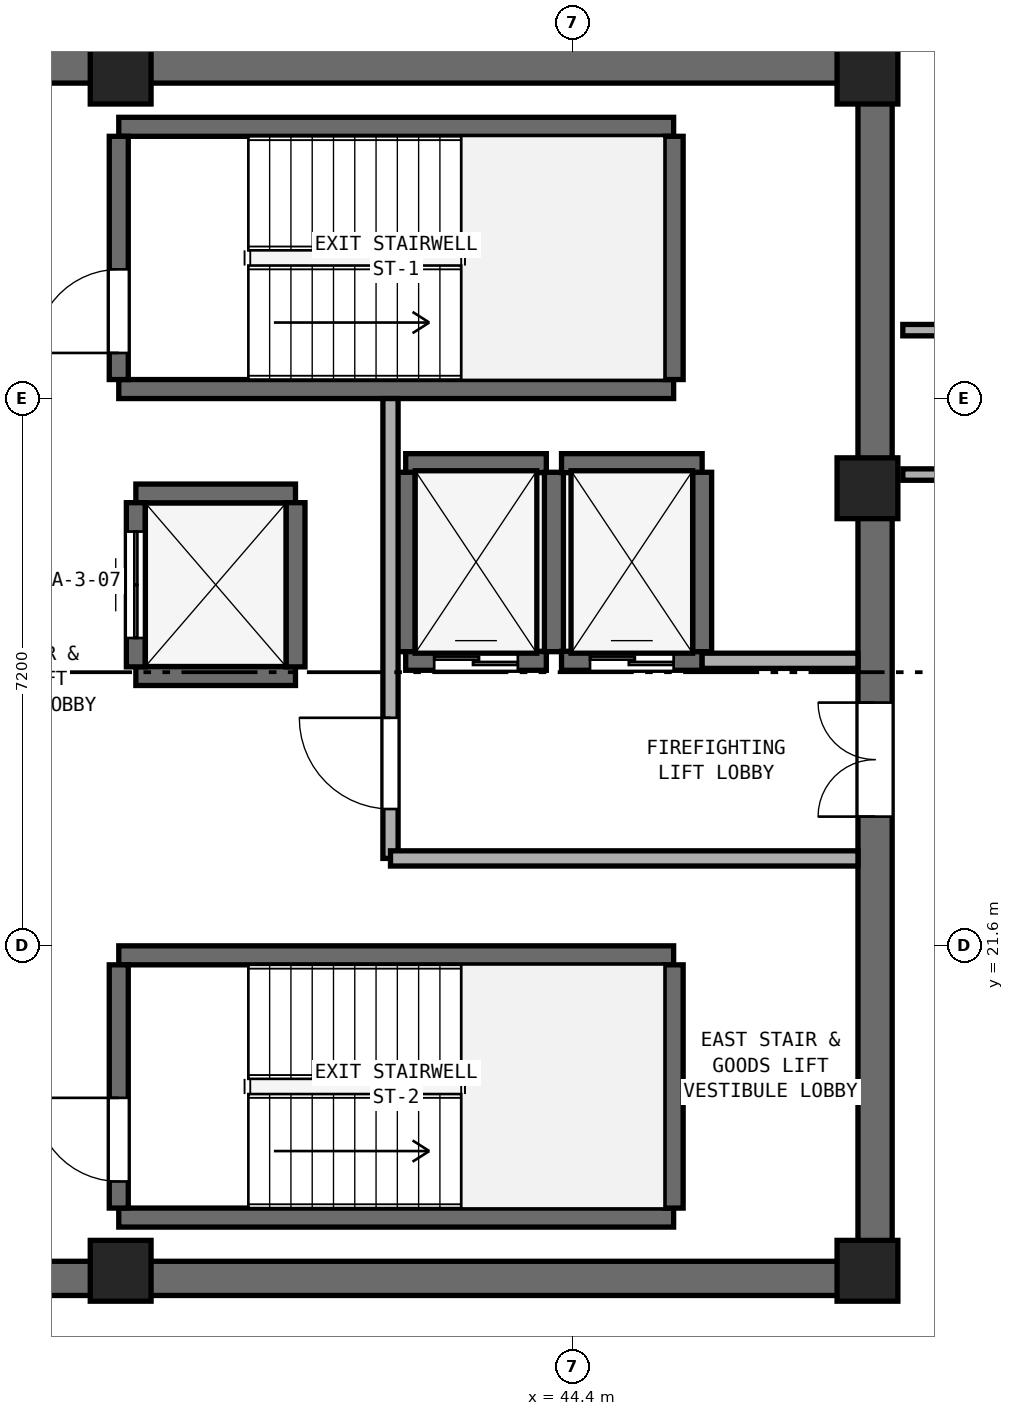
"""IFC4 building model, lengths in metres.
Left out: names, types, materials, properties, quantities, classifications, styles, units other than length and angle.
Written with IfcOpenShell. Run it as: python <this file> out.ifc"""

import sys

from ifc_helpers import new_model, si_unit, direction, frame, frame_2d, origin, origin_2d, place, context, subcontext, project, spatial, rectangle, extrude, element, fill, save


model = new_model("IFC4")
c1 = context("Model", 3, precision=1e-05, world=origin(), true_north=direction((0.0, 1.0)))
c2 = subcontext(c1, "Body", "Model", "MODEL_VIEW")
j1 = project(units=[si_unit("LENGTHUNIT", "METRE"), si_unit("PLANEANGLEUNIT", "RADIAN")], contexts=[c1])
p1 = place(None, origin())
s1 = spatial("IfcSite", under=j1, at=p1, CompositionType="ELEMENT")
p2 = place(p1, origin())
s2 = spatial("IfcBuilding", under=s1, at=p2, CompositionType="ELEMENT")
p3 = place(p2, frame((0.0, 0.0, 301.0)))
s3 = spatial("IfcBuildingStorey", under=s2, at=p3, CompositionType="ELEMENT", Elevation=301.0)
for number, where, z_axis, x_axis in (
    (1, (25.4, 17.225, 0.0), (0.0, 0.0, 1.0), (1.0, 0.0, 0.0)),
    (2, (25.4, 33.175, 0.0), (0.0, 0.0, 1.0), (1.0, 0.0, 0.0)),
):
    element("IfcWall", number, at=place(p3, frame(where, z_axis=z_axis, x_axis=x_axis)), inside=s3, PredefinedType="SHEAR", context=c2, shape_type="SweptSolid", body=[
        extrude(rectangle(XDim=23.2, YDim=0.45, at=frame_2d((11.6, 0.0))), origin(), (0.0, 0.0, 1.0), 3.54),
    ])
p4 = place(p3, frame((48.375, 17.45, 0.0), z_axis=(0.0, 0.0, 1.0), x_axis=(0.0, 1.0, 0.0)))
e3 = element("IfcWall", 3, at=p4, inside=s3, PredefinedType="SHEAR", context=c2, shape_type="SweptSolid", body=[
    extrude(rectangle(XDim=15.5, YDim=0.45, at=frame_2d((7.75, 0.0))), origin(), (0.0, 0.0, 1.0), 3.54),
])
p5 = place(p4, frame((5.85, 0.0, 0.0)))
e4 = element("IfcOpeningElement", 4, at=p5, cuts=e3, PredefinedType="OPENING", context=c2, shape_type="SweptSolid", body=[
    extrude(rectangle(XDim=1.5, YDim=2.15, at=frame_2d((0.75, 1.075))), frame((0.0, 0.235, 0.0), z_axis=(0.0, -1.0, 0.0), x_axis=(1.0, 0.0, 0.0)), (0.0, 0.0, 1.0), 0.47),
])
for number, where, z_axis, x_axis in (
    (5, (38.45, 17.325, 0.0), (0.0, 0.0, 1.0), (1.0, 0.0, 0.0)),
    (6, (48.275, 17.325, 0.0), (0.0, 0.0, 1.0), (1.0, 0.0, 0.0)),
    (7, (48.275, 27.62, 0.0), (0.0, 0.0, 1.0), (1.0, 0.0, 0.0)),
    (8, (48.275, 33.075, 0.0), (0.0, 0.0, 1.0), (1.0, 0.0, 0.0)),
    (9, (38.45, 33.075, 0.0), (0.0, 0.0, 1.0), (1.0, 0.0, 0.0)),
):
    element("IfcColumn", number, at=place(p3, frame(where, z_axis=z_axis, x_axis=x_axis)), inside=s3, PredefinedType="PILASTER", context=c2, shape_type="SweptSolid", body=[
        extrude(rectangle(XDim=0.8, YDim=0.8, at=origin_2d()), origin(), (0.0, 0.0, 1.0), 3.8),
    ])
for number, where, z_axis, x_axis in (
    (10, (38.425, 28.925, 0.0), (0.0, 0.0, 1.0), (1.0, 0.0, 0.0)),
    (11, (38.425, 32.375, 0.0), (0.0, 0.0, 1.0), (1.0, 0.0, 0.0)),
):
    element("IfcWall", number, at=place(p3, frame(where, z_axis=z_axis, x_axis=x_axis)), inside=s3, PredefinedType="SHEAR", context=c2, shape_type="SweptSolid", body=[
        extrude(rectangle(XDim=7.3, YDim=0.25, at=frame_2d((3.65, 0.0))), origin(), (0.0, 0.0, 1.0), 3.54),
    ])
p6 = place(p3, frame((38.425, 29.05, 0.0), z_axis=(0.0, 0.0, 1.0), x_axis=(0.0, 1.0, 0.0)))
e12 = element("IfcWall", 12, at=p6, inside=s3, PredefinedType="SHEAR", context=c2, shape_type="SweptSolid", body=[
    extrude(rectangle(XDim=3.2, YDim=0.25, at=frame_2d((1.6, 0.0))), origin(), (0.0, 0.0, 1.0), 3.54),
])
p7 = place(p6, frame((0.35, 0.0, 0.0)))
e13 = element("IfcOpeningElement", 13, at=p7, cuts=e12, PredefinedType="OPENING", context=c2, shape_type="SweptSolid", body=[
    extrude(rectangle(XDim=1.1, YDim=2.15, at=frame_2d((0.55, 1.075))), frame((0.0, 0.135, 0.0), z_axis=(0.0, -1.0, 0.0), x_axis=(1.0, 0.0, 0.0)), (0.0, 0.0, 1.0), 0.27),
])
p8 = place(p3, frame((45.725, 29.05, 0.0), z_axis=(0.0, 0.0, 1.0), x_axis=(0.0, 1.0, 0.0)))
e14 = element("IfcWall", 14, at=p8, inside=s3, PredefinedType="SHEAR", context=c2, shape_type="SweptSolid", body=[
    extrude(rectangle(XDim=3.2, YDim=0.25, at=frame_2d((1.6, 0.0))), origin(), (0.0, 0.0, 1.0), 3.54),
])
for number, where, z_axis, x_axis in (
    (15, (38.425, 18.025, 0.0), (0.0, 0.0, 1.0), (1.0, 0.0, 0.0)),
    (16, (38.425, 21.475, 0.0), (0.0, 0.0, 1.0), (1.0, 0.0, 0.0)),
):
    element("IfcWall", number, at=place(p3, frame(where, z_axis=z_axis, x_axis=x_axis)), inside=s3, PredefinedType="SHEAR", context=c2, shape_type="SweptSolid", body=[
        extrude(rectangle(XDim=7.3, YDim=0.25, at=frame_2d((3.65, 0.0))), origin(), (0.0, 0.0, 1.0), 3.54),
    ])
p9 = place(p3, frame((38.425, 18.15, 0.0), z_axis=(0.0, 0.0, 1.0), x_axis=(0.0, 1.0, 0.0)))
e17 = element("IfcWall", 17, at=p9, inside=s3, PredefinedType="SHEAR", context=c2, shape_type="SweptSolid", body=[
    extrude(rectangle(XDim=3.2, YDim=0.25, at=frame_2d((1.6, 0.0))), origin(), (0.0, 0.0, 1.0), 3.54),
])
p10 = place(p9, frame((0.35, 0.0, 0.0)))
e18 = element("IfcOpeningElement", 18, at=p10, cuts=e17, PredefinedType="OPENING", context=c2, shape_type="SweptSolid", body=[
    extrude(rectangle(XDim=1.1, YDim=2.15, at=frame_2d((0.55, 1.075))), frame((0.0, 0.135, 0.0), z_axis=(0.0, -1.0, 0.0), x_axis=(1.0, 0.0, 0.0)), (0.0, 0.0, 1.0), 0.27),
])
p11 = place(p3, frame((45.725, 18.15, 0.0), z_axis=(0.0, 0.0, 1.0), x_axis=(0.0, 1.0, 0.0)))
e19 = element("IfcWall", 19, at=p11, inside=s3, PredefinedType="SHEAR", context=c2, shape_type="SweptSolid", body=[
    extrude(rectangle(XDim=3.2, YDim=0.25, at=frame_2d((1.6, 0.0))), origin(), (0.0, 0.0, 1.0), 3.54),
])
p12 = place(p3, frame((42.2, 25.35, 0.0), z_axis=(0.0, 0.0, 1.0), x_axis=(1.0, 0.0, 0.0)))
e20 = element("IfcWall", 20, at=p12, inside=s3, PredefinedType="SHEAR", context=c2, shape_type="SweptSolid", body=[
    extrude(rectangle(XDim=1.85, YDim=0.25, at=frame_2d((0.925, 0.0))), origin(), (0.0, 0.0, 1.0), 3.54),
])
p13 = place(p12, frame((0.375, 0.0, 0.0)))
e21 = element("IfcOpeningElement", 21, at=p13, cuts=e20, PredefinedType="OPENING", context=c2, shape_type="SweptSolid", body=[
    extrude(rectangle(XDim=1.1, YDim=2.15, at=frame_2d((0.55, 1.075))), frame((0.0, 0.135, 0.0), z_axis=(0.0, -1.0, 0.0), x_axis=(1.0, 0.0, 0.0)), (0.0, 0.0, 1.0), 0.27),
])
p14 = place(p3, frame((42.2, 27.95, 0.0), z_axis=(0.0, 0.0, 1.0), x_axis=(1.0, 0.0, 0.0)))
e22 = element("IfcWall", 22, at=p14, inside=s3, PredefinedType="SHEAR", context=c2, shape_type="SweptSolid", body=[
    extrude(rectangle(XDim=1.85, YDim=0.25, at=frame_2d((0.925, 0.0))), origin(), (0.0, 0.0, 1.0), 3.54),
])
for number, where, z_axis, x_axis in (
    (23, (42.2, 25.47, 0.0), (0.0, 0.0, 1.0), (0.0, 1.0, 0.0)),
    (24, (44.15, 25.47, 0.0), (0.0, 0.0, 1.0), (0.0, 1.0, 0.0)),
):
    element("IfcWall", number, at=place(p3, frame(where, z_axis=z_axis, x_axis=x_axis)), inside=s3, PredefinedType="SHEAR", context=c2, shape_type="SweptSolid", body=[
        extrude(rectangle(XDim=2.36, YDim=0.25, at=frame_2d((1.18, 0.0))), origin(), (0.0, 0.0, 1.0), 3.54),
    ])
p15 = place(p3, frame((44.25, 25.35, 0.0), z_axis=(0.0, 0.0, 1.0), x_axis=(1.0, 0.0, 0.0)))
e25 = element("IfcWall", 25, at=p15, inside=s3, PredefinedType="SHEAR", context=c2, shape_type="SweptSolid", body=[
    extrude(rectangle(XDim=1.85, YDim=0.25, at=frame_2d((0.925, 0.0))), origin(), (0.0, 0.0, 1.0), 3.54),
])
p16 = place(p15, frame((0.375, 0.0, 0.0)))
e26 = element("IfcOpeningElement", 26, at=p16, cuts=e25, PredefinedType="OPENING", context=c2, shape_type="SweptSolid", body=[
    extrude(rectangle(XDim=1.1, YDim=2.15, at=frame_2d((0.55, 1.075))), frame((0.0, 0.135, 0.0), z_axis=(0.0, -1.0, 0.0), x_axis=(1.0, 0.0, 0.0)), (0.0, 0.0, 1.0), 0.27),
])
p17 = place(p3, frame((44.25, 27.95, 0.0), z_axis=(0.0, 0.0, 1.0), x_axis=(1.0, 0.0, 0.0)))
e27 = element("IfcWall", 27, at=p17, inside=s3, PredefinedType="SHEAR", context=c2, shape_type="SweptSolid", body=[
    extrude(rectangle(XDim=1.85, YDim=0.25, at=frame_2d((0.925, 0.0))), origin(), (0.0, 0.0, 1.0), 3.54),
])
p18 = place(p3, frame((46.1, 25.47, 0.0), z_axis=(0.0, 0.0, 1.0), x_axis=(0.0, 1.0, 0.0)))
e28 = element("IfcWall", 28, at=p18, inside=s3, PredefinedType="SHEAR", context=c2, shape_type="SweptSolid", body=[
    extrude(rectangle(XDim=2.36, YDim=0.25, at=frame_2d((1.18, 0.0))), origin(), (0.0, 0.0, 1.0), 3.54),
])
for number, where, z_axis, x_axis in (
    (29, (38.65, 25.15, 0.0), (0.0, 0.0, 1.0), (1.0, 0.0, 0.0)),
    (30, (38.65, 27.55, 0.0), (0.0, 0.0, 1.0), (1.0, 0.0, 0.0)),
):
    element("IfcWall", number, at=place(p3, frame(where, z_axis=z_axis, x_axis=x_axis)), inside=s3, PredefinedType="SHEAR", context=c2, shape_type="SweptSolid", body=[
        extrude(rectangle(XDim=2.1, YDim=0.25, at=frame_2d((1.05, 0.0))), origin(), (0.0, 0.0, 1.0), 3.54),
    ])
p19 = place(p3, frame((38.65, 25.27, 0.0), z_axis=(0.0, 0.0, 1.0), x_axis=(0.0, 1.0, 0.0)))
e31 = element("IfcWall", 31, at=p19, inside=s3, PredefinedType="SHEAR", context=c2, shape_type="SweptSolid", body=[
    extrude(rectangle(XDim=2.16, YDim=0.25, at=frame_2d((1.08, 0.0))), origin(), (0.0, 0.0, 1.0), 3.54),
])
p20 = place(p19, frame((0.38, 0.0, 0.0)))
e32 = element("IfcOpeningElement", 32, at=p20, cuts=e31, PredefinedType="OPENING", context=c2, shape_type="SweptSolid", body=[
    extrude(rectangle(XDim=1.4, YDim=2.2, at=frame_2d((0.7, 1.1))), frame((0.0, 0.135, 0.0), z_axis=(0.0, -1.0, 0.0), x_axis=(1.0, 0.0, 0.0)), (0.0, 0.0, 1.0), 0.27),
])
p21 = place(p3, frame((40.75, 25.27, 0.0), z_axis=(0.0, 0.0, 1.0), x_axis=(0.0, 1.0, 0.0)))
e33 = element("IfcWall", 33, at=p21, inside=s3, PredefinedType="SHEAR", context=c2, shape_type="SweptSolid", body=[
    extrude(rectangle(XDim=2.16, YDim=0.25, at=frame_2d((1.08, 0.0))), origin(), (0.0, 0.0, 1.0), 3.54),
])
p22 = place(p3, frame((42.0, 22.75, 0.0), z_axis=(0.0, 0.0, 1.0), x_axis=(0.0, 1.0, 0.0)))
e34 = element("IfcWall", 34, at=p22, inside=s3, PredefinedType="SOLIDWALL", context=c2, shape_type="SweptSolid", body=[
    extrude(rectangle(XDim=6.05, YDim=0.2, at=frame_2d((3.025, 0.0))), origin(), (0.0, 0.0, 1.0), 3.54),
])
p23 = place(p22, frame((0.65, 0.0, 0.0)))
e35 = element("IfcOpeningElement", 35, at=p23, cuts=e34, PredefinedType="OPENING", context=c2, shape_type="SweptSolid", body=[
    extrude(rectangle(XDim=1.2, YDim=2.15, at=frame_2d((0.6, 1.075))), frame((0.0, 0.11, 0.0), z_axis=(0.0, -1.0, 0.0), x_axis=(1.0, 0.0, 0.0)), (0.0, 0.0, 1.0), 0.22),
])
p24 = place(p3, frame((42.0, 22.75, 0.0), z_axis=(0.0, 0.0, 1.0), x_axis=(1.0, 0.0, 0.0)))
e36 = element("IfcWall", 36, at=p24, inside=s3, PredefinedType="SOLIDWALL", context=c2, shape_type="SweptSolid", body=[
    extrude(rectangle(XDim=6.15, YDim=0.2, at=frame_2d((3.075, 0.0))), origin(), (0.0, 0.0, 1.0), 3.54),
])
p25 = place(p3, frame((46.1, 25.35, 0.0), z_axis=(0.0, 0.0, 1.0), x_axis=(1.0, 0.0, 0.0)))
e37 = element("IfcWall", 37, at=p25, inside=s3, PredefinedType="SOLIDWALL", context=c2, shape_type="SweptSolid", body=[
    extrude(rectangle(XDim=2.05, YDim=0.2, at=frame_2d((1.025, 0.0))), origin(), (0.0, 0.0, 1.0), 3.54),
])
p26 = place(p3, frame((48.74, 27.8, 0.0), z_axis=(0.0, 0.0, 1.0), x_axis=(1.0, 0.0, 0.0)))
e38 = element("IfcWall", 38, at=p26, inside=s3, PredefinedType="PARTITIONING", context=c2, shape_type="SweptSolid", body=[
    extrude(rectangle(XDim=2.21, YDim=0.15, at=frame_2d((1.105, 0.0))), origin(), (0.0, 0.0, 1.0), 3.54),
])
p27 = place(p3, frame((48.74, 29.7, 0.0), z_axis=(0.0, 0.0, 1.0), x_axis=(1.0, 0.0, 0.0)))
e39 = element("IfcWall", 39, at=p27, inside=s3, PredefinedType="PARTITIONING", context=c2, shape_type="SweptSolid", body=[
    extrude(rectangle(XDim=13.655, YDim=0.15, at=frame_2d((6.828, 0.0))), origin(), (0.0, 0.0, 1.0), 3.54),
])
p28 = place(p7, origin())
e40 = element("IfcDoor", 40, at=p28, inside=s3, OperationType="SINGLE_SWING_LEFT", PredefinedType="DOOR", context=c2, shape_type="SweptSolid", body=[
    extrude(rectangle(XDim=1.1, YDim=2.15, at=frame_2d((0.55, 1.075))), frame((0.0, 0.025, 0.0), z_axis=(0.0, -1.0, 0.0), x_axis=(1.0, 0.0, 0.0)), (0.0, 0.0, 1.0), 0.05),
])
fill(e13, e40)
p29 = place(p10, origin())
e41 = element("IfcDoor", 41, at=p29, inside=s3, OperationType="SINGLE_SWING_RIGHT", PredefinedType="DOOR", context=c2, shape_type="SweptSolid", body=[
    extrude(rectangle(XDim=1.1, YDim=2.15, at=frame_2d((0.55, 1.075))), frame((0.0, 0.025, 0.0), z_axis=(0.0, -1.0, 0.0), x_axis=(1.0, 0.0, 0.0)), (0.0, 0.0, 1.0), 0.05),
])
fill(e18, e41)
p30 = place(p13, origin())
e42 = element("IfcDoor", 42, at=p30, inside=s3, OperationType="DOUBLE_DOOR_SLIDING", PredefinedType="DOOR", context=c2, shape_type="SweptSolid", body=[
    extrude(rectangle(XDim=1.1, YDim=2.15, at=frame_2d((0.55, 1.075))), frame((0.0, 0.025, 0.0), z_axis=(0.0, -1.0, 0.0), x_axis=(1.0, 0.0, 0.0)), (0.0, 0.0, 1.0), 0.05),
])
fill(e21, e42)
p31 = place(p16, origin())
e43 = element("IfcDoor", 43, at=p31, inside=s3, OperationType="DOUBLE_DOOR_SLIDING", PredefinedType="DOOR", context=c2, shape_type="SweptSolid", body=[
    extrude(rectangle(XDim=1.1, YDim=2.15, at=frame_2d((0.55, 1.075))), frame((0.0, 0.025, 0.0), z_axis=(0.0, -1.0, 0.0), x_axis=(1.0, 0.0, 0.0)), (0.0, 0.0, 1.0), 0.05),
])
fill(e26, e43)
p32 = place(p20, origin())
e44 = element("IfcDoor", 44, at=p32, inside=s3, OperationType="DOUBLE_DOOR_SLIDING", PredefinedType="DOOR", context=c2, shape_type="SweptSolid", body=[
    extrude(rectangle(XDim=1.4, YDim=2.2, at=frame_2d((0.7, 1.1))), frame((0.0, 0.025, 0.0), z_axis=(0.0, -1.0, 0.0), x_axis=(1.0, 0.0, 0.0)), (0.0, 0.0, 1.0), 0.05),
])
fill(e32, e44)
p33 = place(p23, origin())
e45 = element("IfcDoor", 45, at=p33, inside=s3, OperationType="SINGLE_SWING_RIGHT", PredefinedType="DOOR", context=c2, shape_type="SweptSolid", body=[
    extrude(rectangle(XDim=1.2, YDim=2.15, at=frame_2d((0.6, 1.075))), frame((0.0, 0.025, 0.0), z_axis=(0.0, -1.0, 0.0), x_axis=(1.0, 0.0, 0.0)), (0.0, 0.0, 1.0), 0.05),
])
fill(e35, e45)
p34 = place(p5, origin())
e46 = element("IfcDoor", 46, at=p34, inside=s3, OperationType="DOUBLE_DOOR_SINGLE_SWING", PredefinedType="DOOR", context=c2, shape_type="SweptSolid", body=[
    extrude(rectangle(XDim=1.5, YDim=2.15, at=frame_2d((0.75, 1.075))), frame((0.0, 0.025, 0.0), z_axis=(0.0, -1.0, 0.0), x_axis=(1.0, 0.0, 0.0)), (0.0, 0.0, 1.0), 0.05),
])
fill(e4, e46)
save(model, sys.argv[1])
